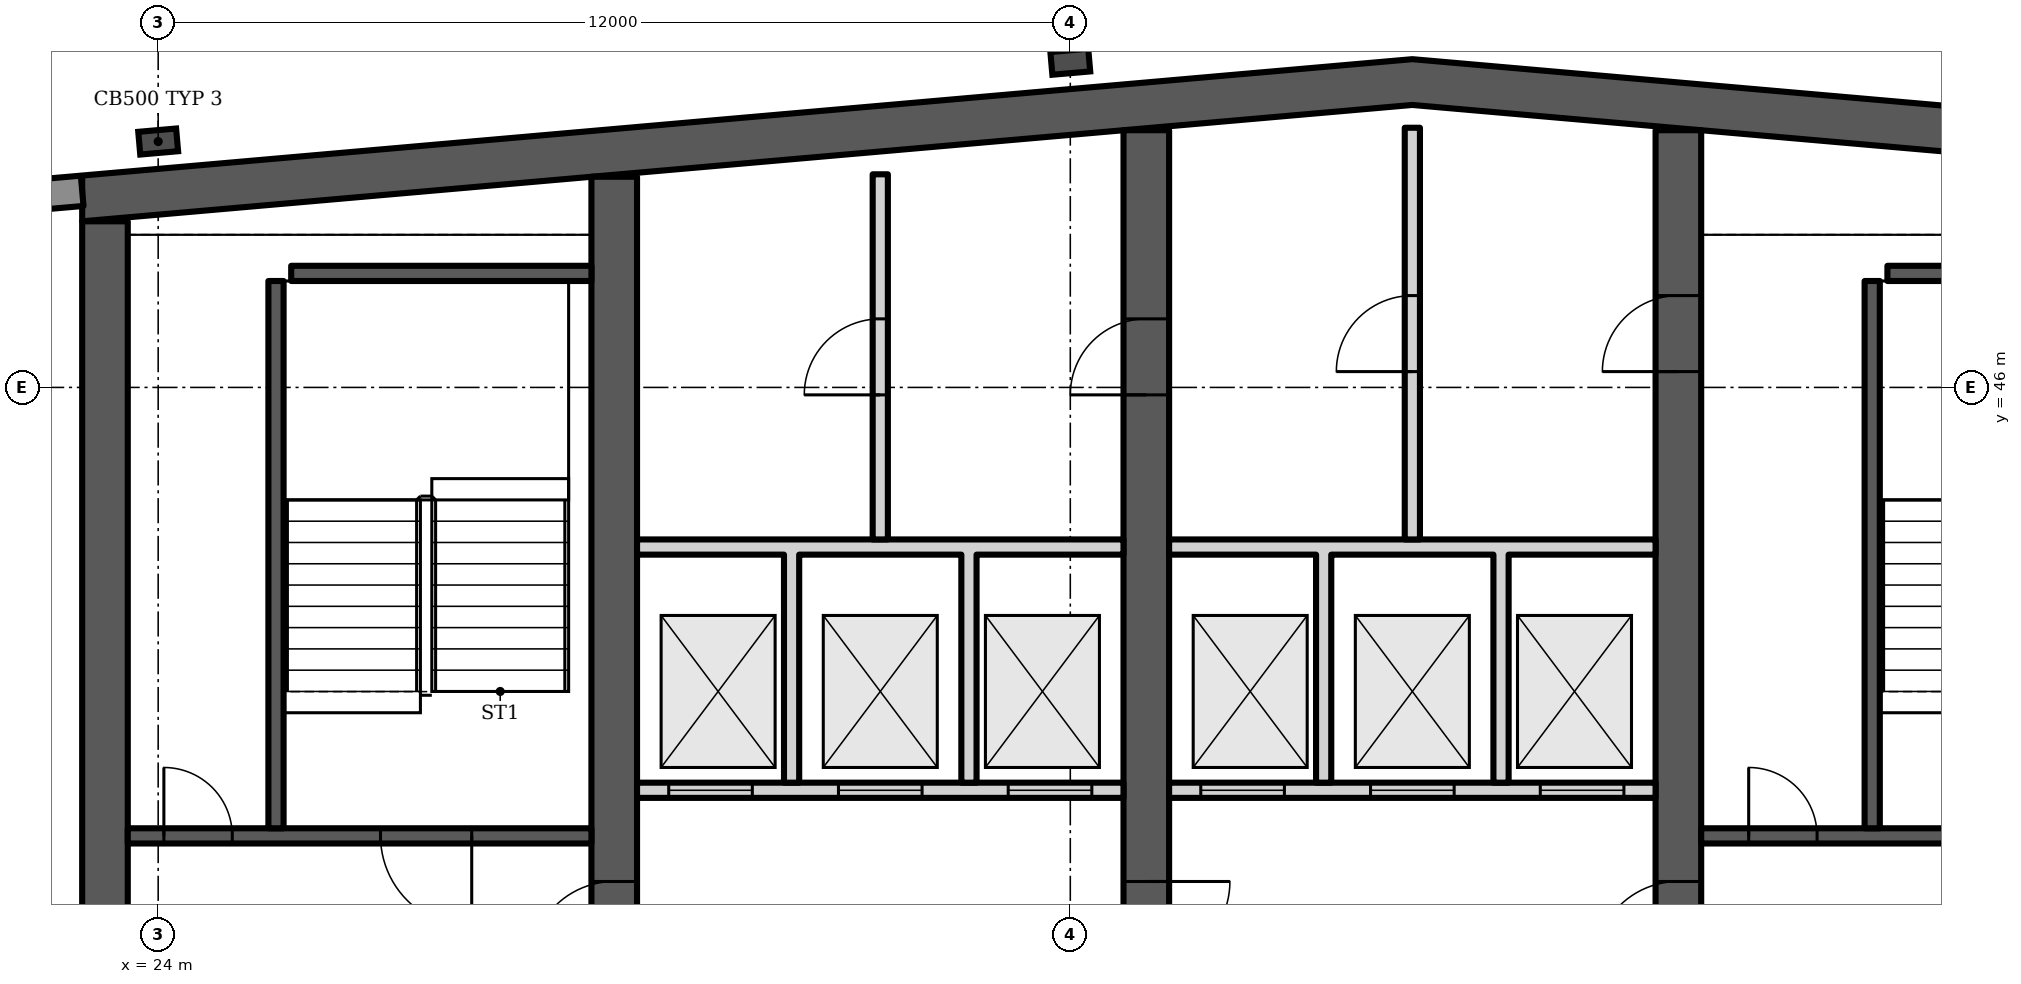
"""IFC4 building model, lengths in metres.
Left out: names, types, materials, properties, quantities, classifications, styles, units other than length and angle.
Written with IfcOpenShell. Run it as: python <this file> out.ifc"""

import sys

from ifc_helpers import new_model, si_unit, direction, frame, frame_2d, origin, origin_2d, place, context, subcontext, project, spatial, polyline, rectangle, i_section, outline, extrude, element, fill, save


model = new_model("IFC4")
c1 = context("Model", 3, precision=1e-05, world=origin(), true_north=direction((0.0, 1.0)))
c2 = subcontext(c1, "Body", "Model", "MODEL_VIEW")
j1 = project(units=[si_unit("LENGTHUNIT", "METRE"), si_unit("PLANEANGLEUNIT", "RADIAN")], contexts=[c1])
p1 = place(None, origin())
s1 = spatial("IfcSite", under=j1, at=p1, CompositionType="ELEMENT")
p2 = place(p1, origin())
s2 = spatial("IfcBuilding", under=s1, at=p2, CompositionType="ELEMENT")
p3 = place(p2, frame((0.0, 0.0, 257.5)))
s3 = spatial("IfcBuildingStorey", under=s2, at=p3, CompositionType="ELEMENT", Elevation=257.5)
p4 = place(p3, origin())
e1 = element("IfcWall", 1, at=p4, inside=s3, PredefinedType="SHEAR", context=c2, shape_type="SweptSolid", body=[
    extrude(outline(polyline([(23.0, 48.185), (40.5, 49.716), (58.0, 48.185), (58.0, 48.787), (40.5, 50.318), (23.0, 48.787), (23.0, 48.185)])), origin(), (0.0, 0.0, 1.0), 3.6),
])
p5 = place(p3, frame((23.3, 34.6, 0.0), z_axis=(0.0, 0.0, 1.0), x_axis=(0.0, 1.0, 0.0)))
e2 = element("IfcWall", 2, at=p5, inside=s3, PredefinedType="SHEAR", context=c2, shape_type="SweptSolid", body=[
    extrude(rectangle(XDim=13.585, YDim=0.6, at=frame_2d((6.792, 0.0))), origin(), (0.0, 0.0, 1.0), 3.6),
])
p6 = place(p3, frame((30.0, 34.6, 0.0), z_axis=(0.0, 0.0, 1.0), x_axis=(0.0, 1.0, 0.0)))
e3 = element("IfcWall", 3, at=p6, inside=s3, PredefinedType="SHEAR", context=c2, shape_type="SweptSolid", body=[
    extrude(rectangle(XDim=14.171, YDim=0.6, at=frame_2d((7.085, 0.0))), origin(), (0.0, 0.0, 1.0), 3.6),
])
p7 = place(p6, frame((3.8, 0.0, 0.0)))
e4 = element("IfcOpeningElement", 4, at=p7, cuts=e3, PredefinedType="OPENING", context=c2, shape_type="SweptSolid", body=[
    extrude(rectangle(XDim=1.1, YDim=2.1, at=frame_2d((0.55, 1.05))), frame((0.0, 0.31, 0.0), z_axis=(0.0, -1.0, 0.0), x_axis=(1.0, 0.0, 0.0)), (0.0, 0.0, 1.0), 0.62),
])
p8 = place(p3, frame((37.0, 34.6, 0.0), z_axis=(0.0, 0.0, 1.0), x_axis=(0.0, 1.0, 0.0)))
e5 = element("IfcWall", 5, at=p8, inside=s3, PredefinedType="SHEAR", context=c2, shape_type="SweptSolid", body=[
    extrude(rectangle(XDim=14.784, YDim=0.6, at=frame_2d((7.392, 0.0))), origin(), (0.0, 0.0, 1.0), 3.6),
])
p9 = place(p8, frame((11.302, 0.0, 0.0)))
e6 = element("IfcOpeningElement", 6, at=p9, cuts=e5, PredefinedType="OPENING", context=c2, shape_type="SweptSolid", body=[
    extrude(rectangle(XDim=1.0, YDim=2.1, at=frame_2d((0.5, 1.05))), frame((0.0, 0.31, 0.0), z_axis=(0.0, -1.0, 0.0), x_axis=(1.0, 0.0, 0.0)), (0.0, 0.0, 1.0), 0.62),
])
p10 = place(p8, frame((3.8, 0.0, 0.0)))
e7 = element("IfcOpeningElement", 7, at=p10, cuts=e5, PredefinedType="OPENING", context=c2, shape_type="SweptSolid", body=[
    extrude(rectangle(XDim=1.1, YDim=2.1, at=frame_2d((0.55, 1.05))), frame((0.0, 0.31, 0.0), z_axis=(0.0, -1.0, 0.0), x_axis=(1.0, 0.0, 0.0)), (0.0, 0.0, 1.0), 0.62),
])
p11 = place(p3, frame((44.0, 34.6, 0.0), z_axis=(0.0, 0.0, 1.0), x_axis=(0.0, 1.0, 0.0)))
e8 = element("IfcWall", 8, at=p11, inside=s3, PredefinedType="SHEAR", context=c2, shape_type="SweptSolid", body=[
    extrude(rectangle(XDim=14.784, YDim=0.6, at=frame_2d((7.392, 0.0))), origin(), (0.0, 0.0, 1.0), 3.6),
])
p12 = place(p11, frame((11.608, 0.0, 0.0)))
e9 = element("IfcOpeningElement", 9, at=p12, cuts=e8, PredefinedType="OPENING", context=c2, shape_type="SweptSolid", body=[
    extrude(rectangle(XDim=1.0, YDim=2.1, at=frame_2d((0.5, 1.05))), frame((0.0, 0.31, 0.0), z_axis=(0.0, -1.0, 0.0), x_axis=(1.0, 0.0, 0.0)), (0.0, 0.0, 1.0), 0.62),
])
p13 = place(p11, frame((3.8, 0.0, 0.0)))
e10 = element("IfcOpeningElement", 10, at=p13, cuts=e8, PredefinedType="OPENING", context=c2, shape_type="SweptSolid", body=[
    extrude(rectangle(XDim=1.1, YDim=2.1, at=frame_2d((0.55, 1.05))), frame((0.0, 0.31, 0.0), z_axis=(0.0, -1.0, 0.0), x_axis=(1.0, 0.0, 0.0)), (0.0, 0.0, 1.0), 0.62),
])
for number, where, z_axis, x_axis in (
    (11, (24.0, 49.235, 0.0), (0.0, 0.0, 1.0), (-0.087, 0.996, 0.0)),
    (12, (36.0, 50.285, 0.0), (0.0, 0.0, 1.0), (-0.087, 0.996, 0.0)),
):
    element("IfcColumn", number, at=place(p3, frame(where, z_axis=z_axis, x_axis=x_axis)), inside=s3, PredefinedType="COLUMN", context=c2, shape_type="SweptSolid", body=[
        extrude(i_section(OverallWidth=0.3, OverallDepth=0.5, WebThickness=0.014, FlangeThickness=0.028, FilletRadius=0.027, at=origin_2d()), origin(), (0.0, 0.0, 1.0), 3.6),
    ])
p14 = place(p3, frame((23.0, 48.587, 0.0), z_axis=(0.0, 0.0, 1.0), x_axis=(-0.996194, -0.087168, 0.0)))
e13 = element("IfcWall", 13, at=p14, inside=s3, PredefinedType="SOLIDWALL", context=c2, shape_type="SweptSolid", body=[
    extrude(rectangle(XDim=2.994, YDim=0.4, at=frame_2d((1.497, 0.0))), origin(), (0.0, 0.0, 1.0), 3.2),
])
p15 = place(p3, frame((23.6, 40.1, 0.0), z_axis=(0.0, 0.0, 1.0), x_axis=(1.0, 0.0, 0.0)))
e14 = element("IfcWall", 14, at=p15, inside=s3, PredefinedType="SHEAR", context=c2, shape_type="SweptSolid", body=[
    extrude(rectangle(XDim=6.1, YDim=0.2, at=frame_2d((3.05, 0.0))), origin(), (0.0, 0.0, 1.0), 3.2),
])
p16 = place(p15, frame((3.325, 0.0, 0.0)))
e15 = element("IfcOpeningElement", 15, at=p16, cuts=e14, PredefinedType="OPENING", context=c2, shape_type="SweptSolid", body=[
    extrude(rectangle(XDim=1.2, YDim=2.1, at=frame_2d((0.6, 1.05))), frame((0.0, 0.11, 0.0), z_axis=(0.0, -1.0, 0.0), x_axis=(1.0, 0.0, 0.0)), (0.0, 0.0, 1.0), 0.22),
])
p17 = place(p15, frame((0.475, 0.0, 0.0)))
e16 = element("IfcOpeningElement", 16, at=p17, cuts=e14, PredefinedType="OPENING", context=c2, shape_type="SweptSolid", body=[
    extrude(rectangle(XDim=0.9, YDim=2.1, at=frame_2d((0.45, 1.05))), frame((0.0, 0.11, 0.0), z_axis=(0.0, -1.0, 0.0), x_axis=(1.0, 0.0, 0.0)), (0.0, 0.0, 1.0), 0.22),
])
p18 = place(p3, frame((25.55, 40.2, 0.0), z_axis=(0.0, 0.0, 1.0), x_axis=(0.0, 1.0, 0.0)))
e17 = element("IfcWall", 17, at=p18, inside=s3, PredefinedType="SHEAR", context=c2, shape_type="SweptSolid", body=[
    extrude(rectangle(XDim=7.2, YDim=0.2, at=frame_2d((3.6, 0.0))), origin(), (0.0, 0.0, 1.0), 3.2),
])
p19 = place(p3, frame((25.75, 47.5, 0.0), z_axis=(0.0, 0.0, 1.0), x_axis=(1.0, 0.0, 0.0)))
e18 = element("IfcWall", 18, at=p19, inside=s3, PredefinedType="SHEAR", context=c2, shape_type="SweptSolid", body=[
    extrude(rectangle(XDim=3.95, YDim=0.2, at=frame_2d((1.975, 0.0))), origin(), (0.0, 0.0, 1.0), 3.2),
])
p20 = place(p3, frame((30.3, 40.7, 0.0), z_axis=(0.0, 0.0, 1.0), x_axis=(1.0, 0.0, 0.0)))
e19 = element("IfcWall", 19, at=p20, inside=s3, PredefinedType="PARTITIONING", context=c2, shape_type="SweptSolid", body=[
    extrude(rectangle(XDim=6.4, YDim=0.2, at=frame_2d((3.2, 0.0))), origin(), (0.0, 0.0, 1.0), 3.2),
])
p21 = place(p20, frame((0.417, 0.0, 0.0)))
e20 = element("IfcOpeningElement", 20, at=p21, cuts=e19, PredefinedType="OPENING", context=c2, shape_type="SweptSolid", body=[
    extrude(rectangle(XDim=1.1, YDim=2.1, at=frame_2d((0.55, 1.05))), frame((0.0, 0.11, 0.0), z_axis=(0.0, -1.0, 0.0), x_axis=(1.0, 0.0, 0.0)), (0.0, 0.0, 1.0), 0.22),
])
p22 = place(p20, frame((2.65, 0.0, 0.0)))
e21 = element("IfcOpeningElement", 21, at=p22, cuts=e19, PredefinedType="OPENING", context=c2, shape_type="SweptSolid", body=[
    extrude(rectangle(XDim=1.1, YDim=2.1, at=frame_2d((0.55, 1.05))), frame((0.0, 0.11, 0.0), z_axis=(0.0, -1.0, 0.0), x_axis=(1.0, 0.0, 0.0)), (0.0, 0.0, 1.0), 0.22),
])
p23 = place(p20, frame((4.883, 0.0, 0.0)))
e22 = element("IfcOpeningElement", 22, at=p23, cuts=e19, PredefinedType="OPENING", context=c2, shape_type="SweptSolid", body=[
    extrude(rectangle(XDim=1.1, YDim=2.1, at=frame_2d((0.55, 1.05))), frame((0.0, 0.11, 0.0), z_axis=(0.0, -1.0, 0.0), x_axis=(1.0, 0.0, 0.0)), (0.0, 0.0, 1.0), 0.22),
])
p24 = place(p3, frame((0.0, 0.0, -0.0)))
e23 = element("IfcWall", 23, at=p24, inside=s3, PredefinedType="PARTITIONING", context=c2, shape_type="SweptSolid", body=[
    extrude(outline(polyline([(32.433, 40.8), (32.233, 40.8), (32.233, 43.8), (30.3, 43.8), (30.3, 44.0), (36.7, 44.0), (36.7, 43.8), (34.767, 43.8), (34.767, 40.8), (34.567, 40.8), (34.567, 43.8), (32.433, 43.8), (32.433, 40.8)])), origin(), (0.0, 0.0, 1.0), 3.2),
])
p25 = place(p3, frame((33.5, 44.0, 0.0), z_axis=(0.0, 0.0, 1.0), x_axis=(0.0, 1.0, 0.0)))
e24 = element("IfcWall", 24, at=p25, inside=s3, PredefinedType="PARTITIONING", context=c2, shape_type="SweptSolid", body=[
    extrude(rectangle(XDim=4.804, YDim=0.2, at=frame_2d((2.402, 0.0))), origin(), (0.0, 0.0, 1.0), 3.2),
])
p26 = place(p25, frame((1.902, 0.0, 0.0)))
e25 = element("IfcOpeningElement", 25, at=p26, cuts=e24, PredefinedType="OPENING", context=c2, shape_type="SweptSolid", body=[
    extrude(rectangle(XDim=1.0, YDim=2.1, at=frame_2d((0.5, 1.05))), frame((0.0, 0.11, 0.0), z_axis=(0.0, -1.0, 0.0), x_axis=(1.0, 0.0, 0.0)), (0.0, 0.0, 1.0), 0.22),
])
p27 = place(p3, frame((37.3, 40.7, 0.0), z_axis=(0.0, 0.0, 1.0), x_axis=(1.0, 0.0, 0.0)))
e26 = element("IfcWall", 26, at=p27, inside=s3, PredefinedType="PARTITIONING", context=c2, shape_type="SweptSolid", body=[
    extrude(rectangle(XDim=6.4, YDim=0.2, at=frame_2d((3.2, 0.0))), origin(), (0.0, 0.0, 1.0), 3.2),
])
p28 = place(p27, frame((0.417, 0.0, 0.0)))
e27 = element("IfcOpeningElement", 27, at=p28, cuts=e26, PredefinedType="OPENING", context=c2, shape_type="SweptSolid", body=[
    extrude(rectangle(XDim=1.1, YDim=2.1, at=frame_2d((0.55, 1.05))), frame((0.0, 0.11, 0.0), z_axis=(0.0, -1.0, 0.0), x_axis=(1.0, 0.0, 0.0)), (0.0, 0.0, 1.0), 0.22),
])
p29 = place(p27, frame((2.65, 0.0, 0.0)))
e28 = element("IfcOpeningElement", 28, at=p29, cuts=e26, PredefinedType="OPENING", context=c2, shape_type="SweptSolid", body=[
    extrude(rectangle(XDim=1.1, YDim=2.1, at=frame_2d((0.55, 1.05))), frame((0.0, 0.11, 0.0), z_axis=(0.0, -1.0, 0.0), x_axis=(1.0, 0.0, 0.0)), (0.0, 0.0, 1.0), 0.22),
])
p30 = place(p27, frame((4.883, 0.0, 0.0)))
e29 = element("IfcOpeningElement", 29, at=p30, cuts=e26, PredefinedType="OPENING", context=c2, shape_type="SweptSolid", body=[
    extrude(rectangle(XDim=1.1, YDim=2.1, at=frame_2d((0.55, 1.05))), frame((0.0, 0.11, 0.0), z_axis=(0.0, -1.0, 0.0), x_axis=(1.0, 0.0, 0.0)), (0.0, 0.0, 1.0), 0.22),
])
p31 = place(p3, frame((0.0, 0.0, -0.0)))
e30 = element("IfcWall", 30, at=p31, inside=s3, PredefinedType="PARTITIONING", context=c2, shape_type="SweptSolid", body=[
    extrude(outline(polyline([(39.433, 40.8), (39.233, 40.8), (39.233, 43.8), (37.3, 43.8), (37.3, 44.0), (43.7, 44.0), (43.7, 43.8), (41.767, 43.8), (41.767, 40.8), (41.567, 40.8), (41.567, 43.8), (39.433, 43.8), (39.433, 40.8)])), origin(), (0.0, 0.0, 1.0), 3.2),
])
p32 = place(p3, frame((40.5, 44.0, 0.0), z_axis=(0.0, 0.0, 1.0), x_axis=(0.0, 1.0, 0.0)))
e31 = element("IfcWall", 31, at=p32, inside=s3, PredefinedType="PARTITIONING", context=c2, shape_type="SweptSolid", body=[
    extrude(rectangle(XDim=5.416, YDim=0.2, at=frame_2d((2.708, 0.0))), origin(), (0.0, 0.0, 1.0), 3.2),
])
p33 = place(p32, frame((2.208, 0.0, 0.0)))
e32 = element("IfcOpeningElement", 32, at=p33, cuts=e31, PredefinedType="OPENING", context=c2, shape_type="SweptSolid", body=[
    extrude(rectangle(XDim=1.0, YDim=2.1, at=frame_2d((0.5, 1.05))), frame((0.0, 0.11, 0.0), z_axis=(0.0, -1.0, 0.0), x_axis=(1.0, 0.0, 0.0)), (0.0, 0.0, 1.0), 0.22),
])
p34 = place(p3, frame((44.3, 40.1, 0.0), z_axis=(0.0, 0.0, 1.0), x_axis=(1.0, 0.0, 0.0)))
e33 = element("IfcWall", 33, at=p34, inside=s3, PredefinedType="SHEAR", context=c2, shape_type="SweptSolid", body=[
    extrude(rectangle(XDim=6.4, YDim=0.2, at=frame_2d((3.2, 0.0))), origin(), (0.0, 0.0, 1.0), 3.2),
])
p35 = place(p34, frame((3.625, 0.0, 0.0)))
e34 = element("IfcOpeningElement", 34, at=p35, cuts=e33, PredefinedType="OPENING", context=c2, shape_type="SweptSolid", body=[
    extrude(rectangle(XDim=1.2, YDim=2.1, at=frame_2d((0.6, 1.05))), frame((0.0, 0.11, 0.0), z_axis=(0.0, -1.0, 0.0), x_axis=(1.0, 0.0, 0.0)), (0.0, 0.0, 1.0), 0.22),
])
p36 = place(p34, frame((0.625, 0.0, 0.0)))
e35 = element("IfcOpeningElement", 35, at=p36, cuts=e33, PredefinedType="OPENING", context=c2, shape_type="SweptSolid", body=[
    extrude(rectangle(XDim=0.9, YDim=2.1, at=frame_2d((0.45, 1.05))), frame((0.0, 0.11, 0.0), z_axis=(0.0, -1.0, 0.0), x_axis=(1.0, 0.0, 0.0)), (0.0, 0.0, 1.0), 0.22),
])
p37 = place(p3, frame((46.55, 40.2, 0.0), z_axis=(0.0, 0.0, 1.0), x_axis=(0.0, 1.0, 0.0)))
e36 = element("IfcWall", 36, at=p37, inside=s3, PredefinedType="SHEAR", context=c2, shape_type="SweptSolid", body=[
    extrude(rectangle(XDim=7.2, YDim=0.2, at=frame_2d((3.6, 0.0))), origin(), (0.0, 0.0, 1.0), 3.2),
])
p38 = place(p3, frame((46.75, 47.5, 0.0), z_axis=(0.0, 0.0, 1.0), x_axis=(1.0, 0.0, 0.0)))
e37 = element("IfcWall", 37, at=p38, inside=s3, PredefinedType="SHEAR", context=c2, shape_type="SweptSolid", body=[
    extrude(rectangle(XDim=3.95, YDim=0.2, at=frame_2d((1.975, 0.0))), origin(), (0.0, 0.0, 1.0), 3.2),
])
p39 = place(p16, origin())
e38 = element("IfcDoor", 38, at=p39, inside=s3, OperationType="SINGLE_SWING_RIGHT", PredefinedType="DOOR", context=c2, shape_type="SweptSolid", body=[
    extrude(rectangle(XDim=1.2, YDim=2.1, at=frame_2d((0.6, 1.05))), frame((0.0, 0.025, 0.0), z_axis=(0.0, -1.0, 0.0), x_axis=(1.0, 0.0, 0.0)), (0.0, 0.0, 1.0), 0.05),
])
fill(e15, e38)
p40 = place(p17, origin())
e39 = element("IfcDoor", 39, at=p40, inside=s3, OperationType="SINGLE_SWING_LEFT", PredefinedType="DOOR", context=c2, shape_type="SweptSolid", body=[
    extrude(rectangle(XDim=0.9, YDim=2.1, at=frame_2d((0.45, 1.05))), frame((0.0, 0.025, 0.0), z_axis=(0.0, -1.0, 0.0), x_axis=(1.0, 0.0, 0.0)), (0.0, 0.0, 1.0), 0.05),
])
fill(e16, e39)
p41 = place(p21, origin())
e40 = element("IfcDoor", 40, at=p41, inside=s3, OperationType="DOUBLE_DOOR_SLIDING", PredefinedType="DOOR", context=c2, shape_type="SweptSolid", body=[
    extrude(rectangle(XDim=1.1, YDim=2.1, at=frame_2d((0.55, 1.05))), frame((0.0, 0.025, 0.0), z_axis=(0.0, -1.0, 0.0), x_axis=(1.0, 0.0, 0.0)), (0.0, 0.0, 1.0), 0.05),
])
fill(e20, e40)
p42 = place(p22, origin())
e41 = element("IfcDoor", 41, at=p42, inside=s3, OperationType="DOUBLE_DOOR_SLIDING", PredefinedType="DOOR", context=c2, shape_type="SweptSolid", body=[
    extrude(rectangle(XDim=1.1, YDim=2.1, at=frame_2d((0.55, 1.05))), frame((0.0, 0.025, 0.0), z_axis=(0.0, -1.0, 0.0), x_axis=(1.0, 0.0, 0.0)), (0.0, 0.0, 1.0), 0.05),
])
fill(e21, e41)
p43 = place(p23, origin())
e42 = element("IfcDoor", 42, at=p43, inside=s3, OperationType="DOUBLE_DOOR_SLIDING", PredefinedType="DOOR", context=c2, shape_type="SweptSolid", body=[
    extrude(rectangle(XDim=1.1, YDim=2.1, at=frame_2d((0.55, 1.05))), frame((0.0, 0.025, 0.0), z_axis=(0.0, -1.0, 0.0), x_axis=(1.0, 0.0, 0.0)), (0.0, 0.0, 1.0), 0.05),
])
fill(e22, e42)
p44 = place(p26, origin())
e43 = element("IfcDoor", 43, at=p44, inside=s3, OperationType="SINGLE_SWING_LEFT", PredefinedType="DOOR", context=c2, shape_type="SweptSolid", body=[
    extrude(rectangle(XDim=1.0, YDim=2.1, at=frame_2d((0.5, 1.05))), frame((0.0, 0.025, 0.0), z_axis=(0.0, -1.0, 0.0), x_axis=(1.0, 0.0, 0.0)), (0.0, 0.0, 1.0), 0.05),
])
fill(e25, e43)
p45 = place(p9, origin())
e44 = element("IfcDoor", 44, at=p45, inside=s3, OperationType="SINGLE_SWING_LEFT", PredefinedType="DOOR", context=c2, shape_type="SweptSolid", body=[
    extrude(rectangle(XDim=1.0, YDim=2.1, at=frame_2d((0.5, 1.05))), frame((0.0, 0.025, 0.0), z_axis=(0.0, -1.0, 0.0), x_axis=(1.0, 0.0, 0.0)), (0.0, 0.0, 1.0), 0.05),
])
fill(e6, e44)
p46 = place(p28, origin())
e45 = element("IfcDoor", 45, at=p46, inside=s3, OperationType="DOUBLE_DOOR_SLIDING", PredefinedType="DOOR", context=c2, shape_type="SweptSolid", body=[
    extrude(rectangle(XDim=1.1, YDim=2.1, at=frame_2d((0.55, 1.05))), frame((0.0, 0.025, 0.0), z_axis=(0.0, -1.0, 0.0), x_axis=(1.0, 0.0, 0.0)), (0.0, 0.0, 1.0), 0.05),
])
fill(e27, e45)
p47 = place(p29, origin())
e46 = element("IfcDoor", 46, at=p47, inside=s3, OperationType="DOUBLE_DOOR_SLIDING", PredefinedType="DOOR", context=c2, shape_type="SweptSolid", body=[
    extrude(rectangle(XDim=1.1, YDim=2.1, at=frame_2d((0.55, 1.05))), frame((0.0, 0.025, 0.0), z_axis=(0.0, -1.0, 0.0), x_axis=(1.0, 0.0, 0.0)), (0.0, 0.0, 1.0), 0.05),
])
fill(e28, e46)
p48 = place(p30, origin())
e47 = element("IfcDoor", 47, at=p48, inside=s3, OperationType="DOUBLE_DOOR_SLIDING", PredefinedType="DOOR", context=c2, shape_type="SweptSolid", body=[
    extrude(rectangle(XDim=1.1, YDim=2.1, at=frame_2d((0.55, 1.05))), frame((0.0, 0.025, 0.0), z_axis=(0.0, -1.0, 0.0), x_axis=(1.0, 0.0, 0.0)), (0.0, 0.0, 1.0), 0.05),
])
fill(e29, e47)
p49 = place(p33, origin())
e48 = element("IfcDoor", 48, at=p49, inside=s3, OperationType="SINGLE_SWING_LEFT", PredefinedType="DOOR", context=c2, shape_type="SweptSolid", body=[
    extrude(rectangle(XDim=1.0, YDim=2.1, at=frame_2d((0.5, 1.05))), frame((0.0, 0.025, 0.0), z_axis=(0.0, -1.0, 0.0), x_axis=(1.0, 0.0, 0.0)), (0.0, 0.0, 1.0), 0.05),
])
fill(e32, e48)
p50 = place(p12, origin())
e49 = element("IfcDoor", 49, at=p50, inside=s3, OperationType="SINGLE_SWING_LEFT", PredefinedType="DOOR", context=c2, shape_type="SweptSolid", body=[
    extrude(rectangle(XDim=1.0, YDim=2.1, at=frame_2d((0.5, 1.05))), frame((0.0, 0.025, 0.0), z_axis=(0.0, -1.0, 0.0), x_axis=(1.0, 0.0, 0.0)), (0.0, 0.0, 1.0), 0.05),
])
fill(e9, e49)
p51 = place(p36, origin())
e50 = element("IfcDoor", 50, at=p51, inside=s3, OperationType="SINGLE_SWING_LEFT", PredefinedType="DOOR", context=c2, shape_type="SweptSolid", body=[
    extrude(rectangle(XDim=0.9, YDim=2.1, at=frame_2d((0.45, 1.05))), frame((0.0, 0.025, 0.0), z_axis=(0.0, -1.0, 0.0), x_axis=(1.0, 0.0, 0.0)), (0.0, 0.0, 1.0), 0.05),
])
fill(e35, e50)
p52 = place(p7, origin())
e51 = element("IfcDoor", 51, at=p52, inside=s3, OperationType="SINGLE_SWING_LEFT", PredefinedType="DOOR", context=c2, shape_type="SweptSolid", body=[
    extrude(rectangle(XDim=1.1, YDim=2.1, at=frame_2d((0.55, 1.05))), frame((0.0, 0.025, 0.0), z_axis=(0.0, -1.0, 0.0), x_axis=(1.0, 0.0, 0.0)), (0.0, 0.0, 1.0), 0.05),
])
fill(e4, e51)
p53 = place(p10, origin())
e52 = element("IfcDoor", 52, at=p53, inside=s3, OperationType="SINGLE_SWING_RIGHT", PredefinedType="DOOR", context=c2, shape_type="SweptSolid", body=[
    extrude(rectangle(XDim=1.1, YDim=2.1, at=frame_2d((0.55, 1.05))), frame((0.0, 0.025, 0.0), z_axis=(0.0, -1.0, 0.0), x_axis=(1.0, 0.0, 0.0)), (0.0, 0.0, 1.0), 0.05),
])
fill(e7, e52)
p54 = place(p13, origin())
e53 = element("IfcDoor", 53, at=p54, inside=s3, OperationType="SINGLE_SWING_LEFT", PredefinedType="DOOR", context=c2, shape_type="SweptSolid", body=[
    extrude(rectangle(XDim=1.1, YDim=2.1, at=frame_2d((0.55, 1.05))), frame((0.0, 0.025, 0.0), z_axis=(0.0, -1.0, 0.0), x_axis=(1.0, 0.0, 0.0)), (0.0, 0.0, 1.0), 0.05),
])
fill(e10, e53)
save(model, sys.argv[1])
